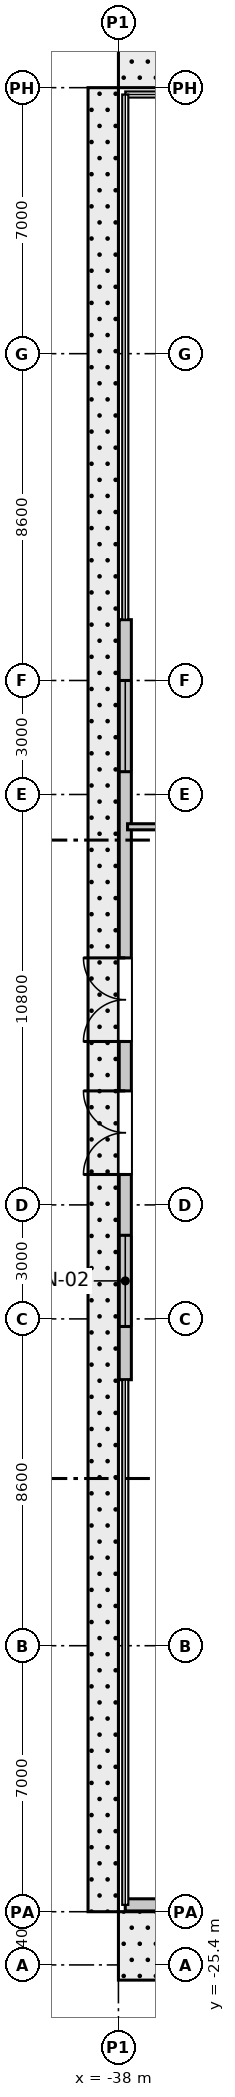
"""IFC4 building model, lengths in metres.
Left out: names, types, materials, properties, quantities, classifications, styles, units other than length and angle.
Written with IfcOpenShell. Run it as: python <this file> out.ifc"""

import sys

from ifc_helpers import new_model, si_unit, direction, frame, frame_2d, origin, place, context, subcontext, project, spatial, rectangle, extrude, source, transform, mapped, element, fill, save


model = new_model("IFC4")
c1 = context("Model", 3, precision=1e-05, world=origin(), true_north=direction((0.0, 1.0)))
c2 = subcontext(c1, "Body", "Model", "MODEL_VIEW")
j1 = project(units=[si_unit("LENGTHUNIT", "METRE"), si_unit("PLANEANGLEUNIT", "RADIAN")], contexts=[c1])
p1 = place(None, origin())
s1 = spatial("IfcSite", under=j1, at=p1, CompositionType="ELEMENT")
p2 = place(p1, origin())
s2 = spatial("IfcBuilding", under=s1, at=p2, CompositionType="ELEMENT")
p3 = place(p2, origin())
s3 = spatial("IfcBuildingStorey", under=s2, at=p3, CompositionType="ELEMENT", Elevation=0.0)
m1 = source(origin(), c2, "Body", "SweptSolid", [
    extrude(rectangle(XDim=11.82, YDim=0.32, at=frame_2d((5.91, 0.0))), origin(), (0.0, 0.0, 1.0), 5.08),
])
p4 = place(p3, frame((-37.82, -23.82, 0.0), z_axis=(0.0, 0.0, 1.0), x_axis=(1.0, 0.0, 0.0)))
e1 = element("IfcWall", 1, at=p4, inside=s3, PredefinedType="STANDARD", context=c2, shape_type="MappedRepresentation", body=[
    mapped(m1, transform((0.0, 0.0, 0.0), scale=1.0)),
])
p5 = place(p4, frame((2.22, 0.0, 0.0)))
e2 = element("IfcOpeningElement", 2, at=p5, cuts=e1, PredefinedType="OPENING", context=c2, shape_type="SweptSolid", body=[
    extrude(rectangle(XDim=6.0, YDim=3.4, at=frame_2d((3.0, 1.7))), frame((0.0, 0.17, 0.0), z_axis=(0.0, -1.0, 0.0), x_axis=(1.0, 0.0, 0.0)), (0.0, 0.0, 1.0), 0.34),
])
m2 = source(origin(), c2, "Body", "SweptSolid", [
    extrude(rectangle(XDim=20.0, YDim=0.32, at=frame_2d((10.0, 0.0))), origin(), (0.0, 0.0, 1.0), 5.08),
])
p6 = place(p3, frame((-37.82, -10.0, 0.0), z_axis=(0.0, 0.0, 1.0), x_axis=(0.0, 1.0, 0.0)))
e3 = element("IfcWall", 3, at=p6, inside=s3, PredefinedType="STANDARD", context=c2, shape_type="MappedRepresentation", body=[
    mapped(m2, transform((0.0, 0.0, 0.0), scale=1.0)),
])
p7 = place(p6, frame((5.4, 0.0, 0.0)))
e4 = element("IfcOpeningElement", 4, at=p7, cuts=e3, PredefinedType="OPENING", context=c2, shape_type="SweptSolid", body=[
    extrude(rectangle(XDim=2.2, YDim=2.6, at=frame_2d((1.1, 1.3))), frame((0.0, 0.17, 0.0), z_axis=(0.0, -1.0, 0.0), x_axis=(1.0, 0.0, 0.0)), (0.0, 0.0, 1.0), 0.34),
])
p8 = place(p6, frame((8.9, 0.0, 0.0)))
e5 = element("IfcOpeningElement", 5, at=p8, cuts=e3, PredefinedType="OPENING", context=c2, shape_type="SweptSolid", body=[
    extrude(rectangle(XDim=2.2, YDim=2.6, at=frame_2d((1.1, 1.3))), frame((0.0, 0.17, 0.0), z_axis=(0.0, -1.0, 0.0), x_axis=(1.0, 0.0, 0.0)), (0.0, 0.0, 1.0), 0.34),
])
p9 = place(p6, frame((1.4, 0.0, 0.9)))
e6 = element("IfcOpeningElement", 6, at=p9, cuts=e3, PredefinedType="OPENING", context=c2, shape_type="SweptSolid", body=[
    extrude(rectangle(XDim=2.4, YDim=2.2, at=frame_2d((1.2, 1.1))), frame((0.0, 0.17, 0.0), z_axis=(0.0, -1.0, 0.0), x_axis=(1.0, 0.0, 0.0)), (0.0, 0.0, 1.0), 0.34),
])
p10 = place(p6, frame((16.0, 0.0, 0.9)))
e7 = element("IfcOpeningElement", 7, at=p10, cuts=e3, PredefinedType="OPENING", context=c2, shape_type="SweptSolid", body=[
    extrude(rectangle(XDim=2.4, YDim=2.2, at=frame_2d((1.2, 1.1))), frame((0.0, 0.17, 0.0), z_axis=(0.0, -1.0, 0.0), x_axis=(1.0, 0.0, 0.0)), (0.0, 0.0, 1.0), 0.34),
])
m3 = source(origin(), c2, "Body", "SweptSolid", [
    extrude(rectangle(XDim=28.96, YDim=0.16, at=frame_2d((14.48, 0.0))), origin(), (0.0, 0.0, 1.0), 3.4),
])
p11 = place(p3, frame((-37.76, 4.55, 0.0), z_axis=(0.0, 0.0, 1.0), x_axis=(1.0, 0.0, 0.0)))
e8 = element("IfcWall", 8, at=p11, inside=s3, PredefinedType="PARTITIONING", context=c2, shape_type="MappedRepresentation", body=[
    mapped(m3, transform((0.0, 0.0, 0.0), scale=1.0)),
])
p12 = place(p11, frame((24.373, 0.0, 0.0)))
e9 = element("IfcOpeningElement", 9, at=p12, cuts=e8, PredefinedType="OPENING", context=c2, shape_type="SweptSolid", body=[
    extrude(rectangle(XDim=1.5, YDim=2.15, at=frame_2d((0.75, 1.075))), frame((0.0, 0.09, 0.0), z_axis=(0.0, -1.0, 0.0), x_axis=(1.0, 0.0, 0.0)), (0.0, 0.0, 1.0), 0.18),
])
m4 = source(origin(), c2, "Body", "SweptSolid", [
    extrude(rectangle(XDim=2.2, YDim=2.6, at=frame_2d((1.1, 1.3))), frame((0.0, 0.025, 0.0), z_axis=(0.0, -1.0, 0.0), x_axis=(1.0, 0.0, 0.0)), (0.0, 0.0, 1.0), 0.05),
])
p13 = place(p7, origin())
e10 = element("IfcDoor", 10, at=p13, inside=s3, OperationType="DOUBLE_DOOR_SINGLE_SWING", PredefinedType="DOOR", context=c2, shape_type="MappedRepresentation", body=[
    mapped(m4, transform((0.0, 0.0, 0.0), scale=1.0)),
])
fill(e4, e10)
p14 = place(p8, origin())
e11 = element("IfcDoor", 11, at=p14, inside=s3, OperationType="DOUBLE_DOOR_SINGLE_SWING", PredefinedType="DOOR", context=c2, shape_type="MappedRepresentation", body=[
    mapped(m4, transform((0.0, 0.0, 0.0), scale=1.0)),
])
fill(e5, e11)
m5 = source(origin(), c2, "Body", "SweptSolid", [
    extrude(rectangle(XDim=2.4, YDim=2.2, at=frame_2d((1.2, 1.1))), frame((0.0, 0.03, 0.0), z_axis=(0.0, -1.0, 0.0), x_axis=(1.0, 0.0, 0.0)), (0.0, 0.0, 1.0), 0.06),
])
p15 = place(p9, origin())
e12 = element("IfcWindow", 12, at=p15, inside=s3, PartitioningType="SINGLE_PANEL", PredefinedType="WINDOW", context=c2, shape_type="MappedRepresentation", body=[
    mapped(m5, transform((0.0, 0.0, 0.0), scale=1.0)),
])
fill(e6, e12)
p16 = place(p10, origin())
e13 = element("IfcWindow", 13, at=p16, inside=s3, PartitioningType="SINGLE_PANEL", PredefinedType="WINDOW", context=c2, shape_type="MappedRepresentation", body=[
    mapped(m5, transform((0.0, 0.0, 0.0), scale=1.0)),
])
fill(e7, e13)
save(model, sys.argv[1])
